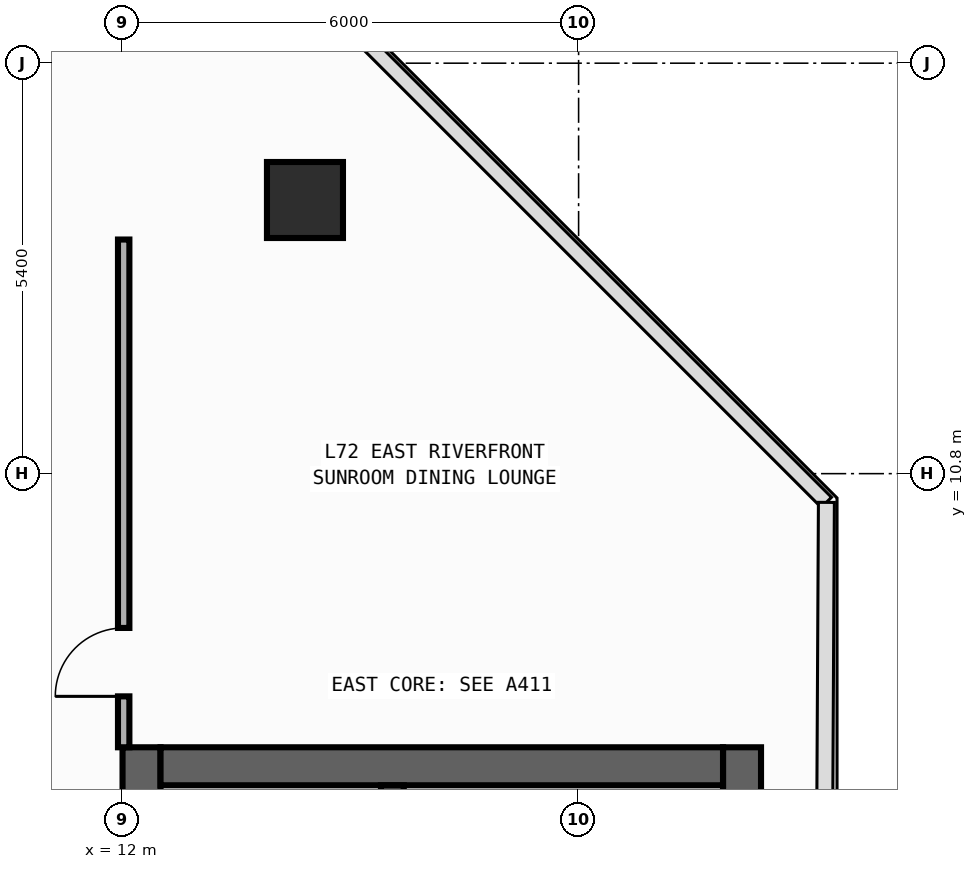
"""IFC4 building model, lengths in metres.
Left out: names, types, materials, properties, quantities, classifications, styles, units other than length and angle.
Written with IfcOpenShell. Run it as: python <this file> out.ifc"""

import sys

from ifc_helpers import new_model, si_unit, direction, frame, frame_2d, origin, origin_2d, place, context, subcontext, project, spatial, rectangle, circle, extrude, element, fill, save


model = new_model("IFC4")
c1 = context("Model", 3, precision=1e-05, world=origin(), true_north=direction((0.0, 1.0)))
c2 = subcontext(c1, "Body", "Model", "MODEL_VIEW")
j1 = project(units=[si_unit("LENGTHUNIT", "METRE"), si_unit("PLANEANGLEUNIT", "RADIAN")], contexts=[c1])
p1 = place(None, origin())
s1 = spatial("IfcSite", under=j1, at=p1, CompositionType="ELEMENT")
p2 = place(p1, origin())
s2 = spatial("IfcBuilding", under=s1, at=p2, CompositionType="ELEMENT")
p3 = place(p2, frame((0.0, 0.0, 300.4)))
s3 = spatial("IfcBuildingStorey", under=s2, at=p3, CompositionType="ELEMENT", Elevation=300.4)
p4 = place(p3, frame((12.25, -19.8, 0.0), z_axis=(0.0, 0.0, 1.0), x_axis=(0.0, 1.0, 0.0)))
e1 = element("IfcWall", 1, at=p4, inside=s3, PredefinedType="SHEAR", context=c2, shape_type="SweptSolid", body=[
    extrude(rectangle(XDim=27.0, YDim=0.5, at=frame_2d((13.5, 0.0))), origin(), (0.0, 0.0, 1.0), 3.54),
])
p5 = place(p4, frame((23.05, 0.0, 0.0)))
e2 = element("IfcOpeningElement", 2, at=p5, cuts=e1, PredefinedType="OPENING", context=c2, shape_type="SweptSolid", body=[
    extrude(rectangle(XDim=1.1, YDim=2.2, at=frame_2d((0.55, 1.1))), frame((0.0, 0.26, 0.0), z_axis=(0.0, -1.0, 0.0), x_axis=(1.0, 0.0, 0.0)), (0.0, 0.0, 1.0), 0.52),
])
p6 = place(p4, frame((19.85, 0.0, 0.0)))
e3 = element("IfcOpeningElement", 3, at=p6, cuts=e1, PredefinedType="OPENING", context=c2, shape_type="SweptSolid", body=[
    extrude(rectangle(XDim=1.1, YDim=2.2, at=frame_2d((0.55, 1.1))), frame((0.0, 0.26, 0.0), z_axis=(0.0, -1.0, 0.0), x_axis=(1.0, 0.0, 0.0)), (0.0, 0.0, 1.0), 0.52),
])
p7 = place(p4, frame((16.65, 0.0, 0.0)))
e4 = element("IfcOpeningElement", 4, at=p7, cuts=e1, PredefinedType="OPENING", context=c2, shape_type="SweptSolid", body=[
    extrude(rectangle(XDim=1.1, YDim=2.2, at=frame_2d((0.55, 1.1))), frame((0.0, 0.26, 0.0), z_axis=(0.0, -1.0, 0.0), x_axis=(1.0, 0.0, 0.0)), (0.0, 0.0, 1.0), 0.52),
])
p8 = place(p4, frame((7.175, 0.0, 0.0)))
e5 = element("IfcOpeningElement", 5, at=p8, cuts=e1, PredefinedType="OPENING", context=c2, shape_type="SweptSolid", body=[
    extrude(rectangle(XDim=0.85, YDim=2.1, at=frame_2d((0.425, 1.05))), frame((0.0, 0.26, 0.0), z_axis=(0.0, -1.0, 0.0), x_axis=(1.0, 0.0, 0.0)), (0.0, 0.0, 1.0), 0.52),
])
p9 = place(p4, frame((10.375, 0.0, 0.0)))
e6 = element("IfcOpeningElement", 6, at=p9, cuts=e1, PredefinedType="OPENING", context=c2, shape_type="SweptSolid", body=[
    extrude(rectangle(XDim=0.85, YDim=2.1, at=frame_2d((0.425, 1.05))), frame((0.0, 0.26, 0.0), z_axis=(0.0, -1.0, 0.0), x_axis=(1.0, 0.0, 0.0)), (0.0, 0.0, 1.0), 0.52),
])
p10 = place(p4, frame((12.725, 0.0, 0.0)))
e7 = element("IfcOpeningElement", 7, at=p10, cuts=e1, PredefinedType="OPENING", context=c2, shape_type="SweptSolid", body=[
    extrude(rectangle(XDim=1.15, YDim=2.2, at=frame_2d((0.575, 1.1))), frame((0.0, 0.26, 0.0), z_axis=(0.0, -1.0, 0.0), x_axis=(1.0, 0.0, 0.0)), (0.0, 0.0, 1.0), 0.52),
])
p11 = place(p4, frame((25.125, 0.0, 0.0)))
e8 = element("IfcOpeningElement", 8, at=p11, cuts=e1, PredefinedType="OPENING", context=c2, shape_type="SweptSolid", body=[
    extrude(rectangle(XDim=0.85, YDim=2.1, at=frame_2d((0.425, 1.05))), frame((0.0, 0.26, 0.0), z_axis=(0.0, -1.0, 0.0), x_axis=(1.0, 0.0, 0.0)), (0.0, 0.0, 1.0), 0.52),
])
p12 = place(p3, frame((20.15, -19.8, 0.0), z_axis=(0.0, 0.0, 1.0), x_axis=(0.0, 1.0, 0.0)))
e9 = element("IfcWall", 9, at=p12, inside=s3, PredefinedType="SHEAR", context=c2, shape_type="SweptSolid", body=[
    extrude(rectangle(XDim=27.0, YDim=0.5, at=frame_2d((13.5, 0.0))), origin(), (0.0, 0.0, 1.0), 3.54),
])
p13 = place(p3, frame((12.5, 6.95, 0.0), z_axis=(0.0, 0.0, 1.0), x_axis=(1.0, 0.0, 0.0)))
e10 = element("IfcWall", 10, at=p13, inside=s3, PredefinedType="SHEAR", context=c2, shape_type="SweptSolid", body=[
    extrude(rectangle(XDim=7.4, YDim=0.5, at=frame_2d((3.7, 0.0))), origin(), (0.0, 0.0, 1.0), 3.54),
])
p14 = place(p3, frame((15.55, -19.3, 0.0), z_axis=(0.0, 0.0, 1.0), x_axis=(0.0, 1.0, 0.0)))
e11 = element("IfcWall", 11, at=p14, inside=s3, PredefinedType="SHEAR", context=c2, shape_type="SweptSolid", body=[
    extrude(rectangle(XDim=26.0, YDim=0.3, at=frame_2d((13.0, 0.0))), origin(), (0.0, 0.0, 1.0), 3.54),
])
p15 = place(p14, frame((12.225, 0.0, 0.0)))
e12 = element("IfcOpeningElement", 12, at=p15, cuts=e11, PredefinedType="OPENING", context=c2, shape_type="SweptSolid", body=[
    extrude(rectangle(XDim=1.15, YDim=2.2, at=frame_2d((0.575, 1.1))), frame((0.0, 0.16, 0.0), z_axis=(0.0, -1.0, 0.0), x_axis=(1.0, 0.0, 0.0)), (0.0, 0.0, 1.0), 0.32),
])
p16 = place(p14, frame((24.625, 0.0, 0.0)))
e13 = element("IfcOpeningElement", 13, at=p16, cuts=e11, PredefinedType="OPENING", context=c2, shape_type="SweptSolid", body=[
    extrude(rectangle(XDim=0.85, YDim=2.1, at=frame_2d((0.425, 1.05))), frame((0.0, 0.16, 0.0), z_axis=(0.0, -1.0, 0.0), x_axis=(1.0, 0.0, 0.0)), (0.0, 0.0, 1.0), 0.32),
])
p17 = place(p3, frame((14.4, 14.4, 0.0), z_axis=(0.0, 0.0, 1.0), x_axis=(1.0, 0.0, 0.0)))
e14 = element("IfcColumn", 14, at=p17, inside=s3, PredefinedType="COLUMN", context=c2, shape_type="SweptSolid", body=[
    extrude(circle(Radius=0.5, at=origin_2d()), origin(), (0.0, 0.0, 1.0), 3.8),
])
p18 = place(p3, frame((12.015, 7.2, 0.0), z_axis=(0.0, 0.0, 1.0), x_axis=(0.0, 1.0, 0.0)))
e15 = element("IfcWall", 15, at=p18, inside=s3, PredefinedType="PARTITIONING", context=c2, shape_type="SweptSolid", body=[
    extrude(rectangle(XDim=6.68, YDim=0.15, at=frame_2d((3.34, 0.0))), origin(), (0.0, 0.0, 1.0), 3.54),
])
p19 = place(p18, frame((0.67, 0.0, 0.0)))
e16 = element("IfcOpeningElement", 16, at=p19, cuts=e15, PredefinedType="OPENING", context=c2, shape_type="SweptSolid", body=[
    extrude(rectangle(XDim=0.9, YDim=2.15, at=frame_2d((0.45, 1.075))), frame((0.0, 0.085, 0.0), z_axis=(0.0, -1.0, 0.0), x_axis=(1.0, 0.0, 0.0)), (0.0, 0.0, 1.0), 0.17),
])
p20 = place(p19, origin())
e17 = element("IfcDoor", 17, at=p20, inside=s3, OperationType="SINGLE_SWING_LEFT", PredefinedType="DOOR", context=c2, shape_type="SweptSolid", body=[
    extrude(rectangle(XDim=0.9, YDim=2.15, at=frame_2d((0.45, 1.075))), frame((0.0, 0.025, 0.0), z_axis=(0.0, -1.0, 0.0), x_axis=(1.0, 0.0, 0.0)), (0.0, 0.0, 1.0), 0.05),
])
fill(e16, e17)
save(model, sys.argv[1])
